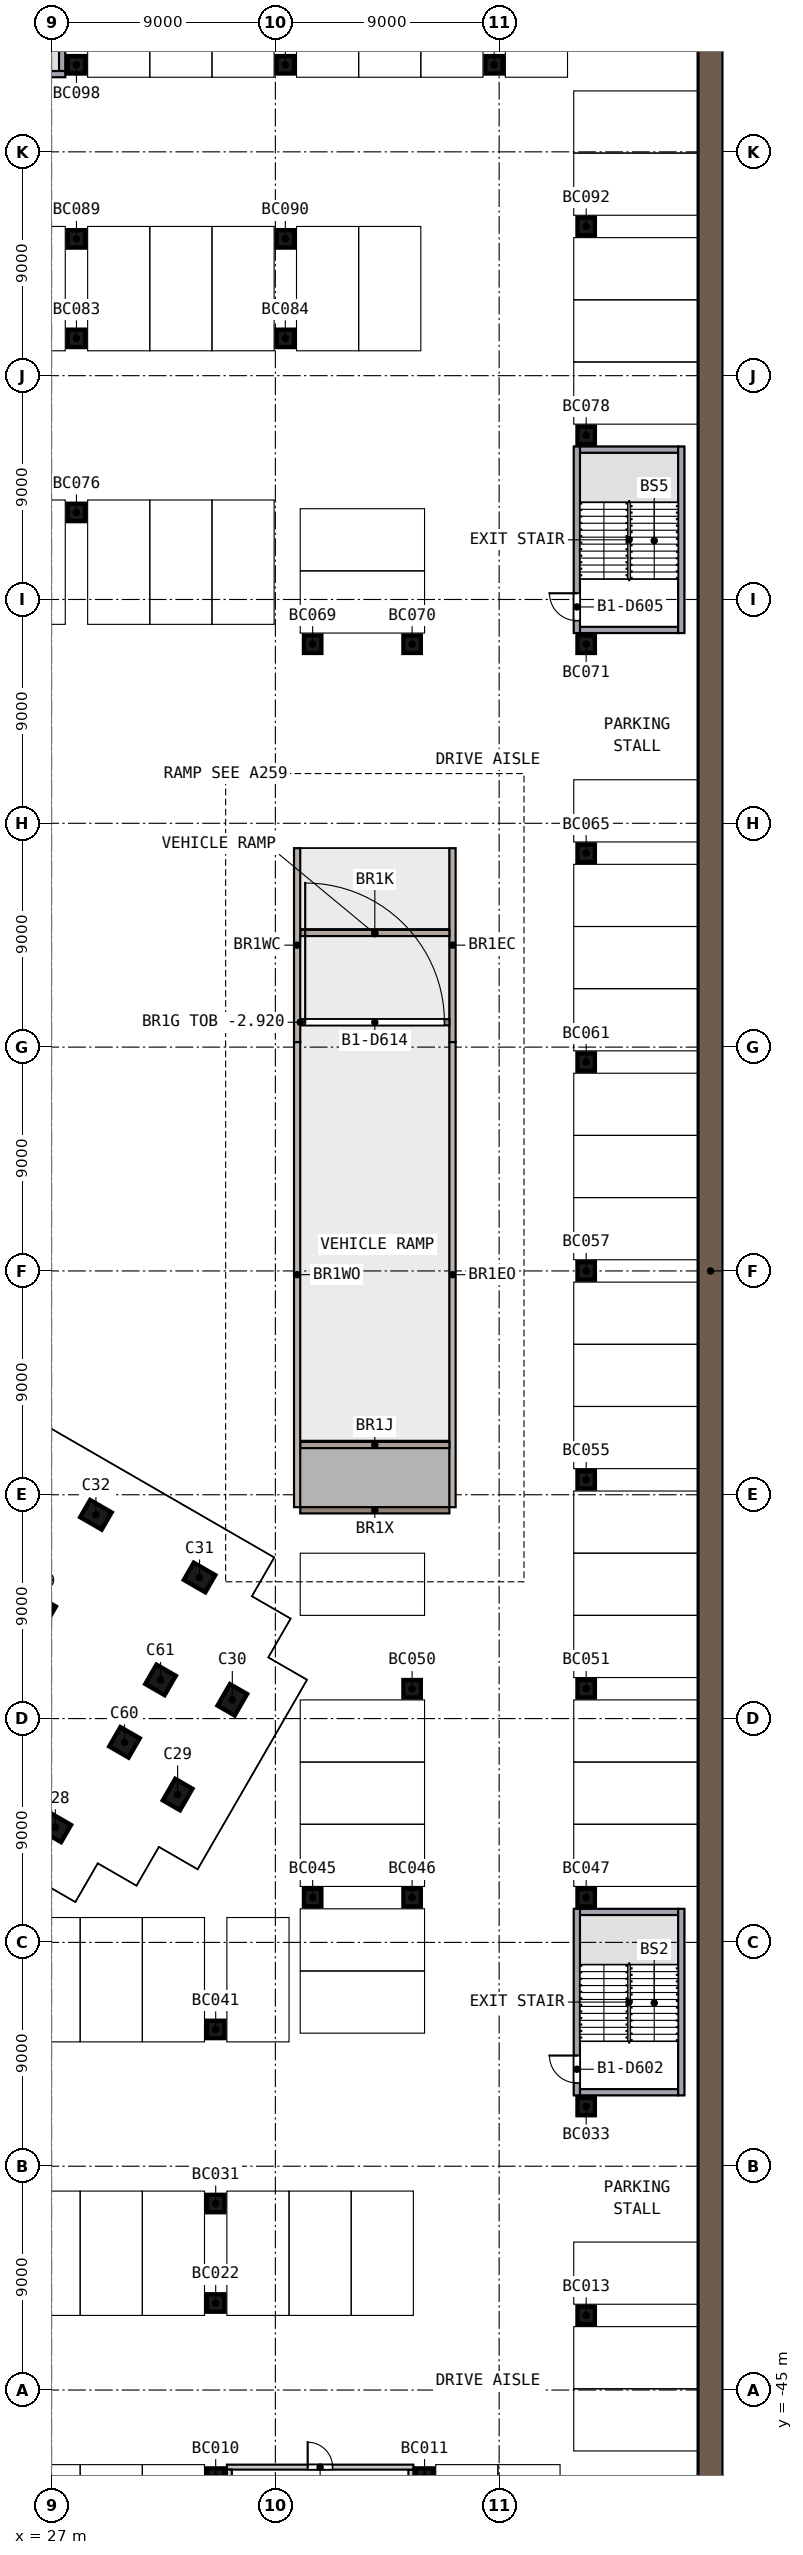
"""IFC4 building model, lengths in metres.
Left out: names, types, materials, properties, quantities, classifications, styles, units other than length and angle.
Written with IfcOpenShell. Run it as: python <this file> out.ifc"""

import sys

from ifc_helpers import new_model, si_unit, direction, frame, frame_2d, origin, origin_2d, place, context, subcontext, project, spatial, polyline, rectangle, outline, extrude, element, fill, save


model = new_model("IFC4")
c1 = context("Model", 3, precision=1e-05, world=origin(), true_north=direction((0.0, 1.0)))
c2 = subcontext(c1, "Body", "Model", "MODEL_VIEW")
j1 = project(units=[si_unit("LENGTHUNIT", "METRE"), si_unit("PLANEANGLEUNIT", "RADIAN")], contexts=[c1])
p1 = place(None, origin())
s1 = spatial("IfcSite", under=j1, at=p1, CompositionType="ELEMENT")
p2 = place(p1, origin())
s2 = spatial("IfcBuilding", under=s1, at=p2, CompositionType="ELEMENT")
p3 = place(p2, frame((0.0, 0.0, -3.9)))
s3 = spatial("IfcBuildingStorey", under=s2, at=p3, CompositionType="ELEMENT", Elevation=-3.9)
for number, where, z_axis, x_axis in (
    (1, (27.151, -22.373, 0.0), (0.0, 0.0, 1.0), (0.866, -0.5, 0.0)),
    (2, (32.069, -21.055, 0.0), (0.0, 0.0, 1.0), (0.5, 0.866, 0.0)),
    (3, (34.269, -17.245, 0.0), (0.0, 0.0, 1.0), (0.5, 0.866, 0.0)),
    (4, (32.951, -12.327, 0.0), (0.0, 0.0, 1.0), (-0.866, 0.5, 0.0)),
    (5, (28.783, -9.805, 0.0), (0.0, 0.0, 1.0), (-0.866, 0.5, 0.0)),
):
    element("IfcColumn", number, at=place(p3, frame(where, z_axis=z_axis, x_axis=x_axis)), inside=s3, PredefinedType="COLUMN", context=c2, shape_type="SweptSolid", body=[
        extrude(rectangle(XDim=1.0, YDim=0.8, at=origin_2d()), origin(), (0.0, 0.0, 1.0), 3.45),
    ])
for number, where, z_axis, x_axis in (
    (6, (26.558, -13.659, 0.0), (0.0, 0.0, 1.0), (0.866, -0.5, 0.0)),
    (7, (29.932, -18.956, 0.0), (0.0, 0.0, 1.0), (0.866, -0.5, 0.0)),
    (8, (31.382, -16.444, 0.0), (0.0, 0.0, 1.0), (0.866, -0.5, 0.0)),
):
    element("IfcColumn", number, at=place(p3, frame(where, z_axis=z_axis, x_axis=x_axis)), inside=s3, PredefinedType="COLUMN", context=c2, shape_type="SweptSolid", body=[
        extrude(rectangle(XDim=0.9, YDim=0.9, at=origin_2d()), origin(), (0.0, 0.0, 1.0), 3.45),
    ])
p4 = place(p3, origin())
e9 = element("IfcWall", 9, at=p4, inside=s3, PredefinedType="SOLIDWALL", context=c2, shape_type="SweptSolid", body=[
    extrude(outline(polyline([(54.0, -54.0), (54.0, 54.0), (53.0, 53.0), (53.0, -53.0), (54.0, -54.0)])), origin(), (0.0, 0.0, 1.0), 3.9),
])
for number, where, z_axis, x_axis in (
    (10, (33.6, -48.5, 0.0), (0.0, 0.0, 1.0), (1.0, 0.0, 0.0)),
    (11, (42.0, -48.5, 0.0), (0.0, 0.0, 1.0), (1.0, 0.0, 0.0)),
    (12, (48.5, -42.0, 0.0), (0.0, 0.0, 1.0), (1.0, 0.0, 0.0)),
    (13, (33.6, -41.5, 0.0), (0.0, 0.0, 1.0), (1.0, 0.0, 0.0)),
    (14, (33.6, -37.5, 0.0), (0.0, 0.0, 1.0), (1.0, 0.0, 0.0)),
    (15, (48.5, -33.6, 0.0), (0.0, 0.0, 1.0), (1.0, 0.0, 0.0)),
    (16, (33.6, -30.5, 0.0), (0.0, 0.0, 1.0), (1.0, 0.0, 0.0)),
    (17, (37.5, -25.2, 0.0), (0.0, 0.0, 1.0), (1.0, 0.0, 0.0)),
    (18, (41.5, -25.2, 0.0), (0.0, 0.0, 1.0), (1.0, 0.0, 0.0)),
    (19, (48.5, -25.2, 0.0), (0.0, 0.0, 1.0), (1.0, 0.0, 0.0)),
    (20, (41.5, -16.8, 0.0), (0.0, 0.0, 1.0), (1.0, 0.0, 0.0)),
    (21, (48.5, -16.8, 0.0), (0.0, 0.0, 1.0), (1.0, 0.0, 0.0)),
    (22, (48.5, -8.4, 0.0), (0.0, 0.0, 1.0), (1.0, 0.0, 0.0)),
    (23, (48.5, 0.0, 0.0), (0.0, 0.0, 1.0), (1.0, 0.0, 0.0)),
    (24, (48.5, 8.4, 0.0), (0.0, 0.0, 1.0), (1.0, 0.0, 0.0)),
    (25, (48.5, 16.8, 0.0), (0.0, 0.0, 1.0), (1.0, 0.0, 0.0)),
    (26, (37.5, 25.2, 0.0), (0.0, 0.0, 1.0), (1.0, 0.0, 0.0)),
    (27, (41.5, 25.2, 0.0), (0.0, 0.0, 1.0), (1.0, 0.0, 0.0)),
    (28, (48.5, 25.2, 0.0), (0.0, 0.0, 1.0), (1.0, 0.0, 0.0)),
    (29, (28.0, 30.5, 0.0), (0.0, 0.0, 1.0), (1.0, 0.0, 0.0)),
    (30, (48.5, 33.6, 0.0), (0.0, 0.0, 1.0), (1.0, 0.0, 0.0)),
    (31, (28.0, 37.5, 0.0), (0.0, 0.0, 1.0), (1.0, 0.0, 0.0)),
    (32, (36.4, 37.5, 0.0), (0.0, 0.0, 1.0), (1.0, 0.0, 0.0)),
    (33, (28.0, 41.5, 0.0), (0.0, 0.0, 1.0), (1.0, 0.0, 0.0)),
    (34, (36.4, 41.5, 0.0), (0.0, 0.0, 1.0), (1.0, 0.0, 0.0)),
    (35, (48.5, 42.0, 0.0), (0.0, 0.0, 1.0), (1.0, 0.0, 0.0)),
    (36, (28.0, 48.5, 0.0), (0.0, 0.0, 1.0), (1.0, 0.0, 0.0)),
    (37, (36.4, 48.5, 0.0), (0.0, 0.0, 1.0), (1.0, 0.0, 0.0)),
    (38, (44.8, 48.5, 0.0), (0.0, 0.0, 1.0), (1.0, 0.0, 0.0)),
):
    element("IfcColumn", number, at=place(p3, frame(where, z_axis=z_axis, x_axis=x_axis)), inside=s3, PredefinedType="COLUMN", context=c2, shape_type="SweptSolid", body=[
        extrude(rectangle(XDim=0.7, YDim=0.7, at=origin_2d()), origin(), (0.0, 0.0, 1.0), 3.84),
    ])
for number, where, z_axis, x_axis in (
    (39, (36.875, -9.5, 0.0), (0.0, 0.0, 1.0), (0.0, 1.0, 0.0)),
    (40, (43.125, -9.5, 0.0), (0.0, 0.0, 1.0), (0.0, 1.0, 0.0)),
):
    element("IfcWall", number, at=place(p3, frame(where, z_axis=z_axis, x_axis=x_axis)), inside=s3, PredefinedType="SOLIDWALL", context=c2, shape_type="SweptSolid", body=[
        extrude(rectangle(XDim=18.7, YDim=0.25, at=frame_2d((9.35, 0.0))), origin(), (0.0, 0.0, 1.0), 3.9),
    ])
for number, where, z_axis, x_axis in (
    (41, (36.875, 9.2, 0.0), (0.0, 0.0, 1.0), (0.0, 1.0, 0.0)),
    (42, (43.125, 9.2, 0.0), (0.0, 0.0, 1.0), (0.0, 1.0, 0.0)),
):
    element("IfcWall", number, at=place(p3, frame(where, z_axis=z_axis, x_axis=x_axis)), inside=s3, PredefinedType="SOLIDWALL", context=c2, shape_type="SweptSolid", body=[
        extrude(rectangle(XDim=7.8, YDim=0.25, at=frame_2d((3.9, 0.0))), origin(), (0.0, 0.0, 1.0), 3.3),
    ])
p5 = place(p3, frame((37.0, -9.625, 0.0), z_axis=(0.0, 0.0, 1.0), x_axis=(1.0, 0.0, 0.0)))
e43 = element("IfcWall", 43, at=p5, inside=s3, PredefinedType="SOLIDWALL", context=c2, shape_type="SweptSolid", body=[
    extrude(rectangle(XDim=6.0, YDim=0.25, at=frame_2d((3.0, 0.0))), origin(), (0.0, 0.0, 1.0), 3.3),
])
p6 = place(p3, frame((37.0, -7.0, 0.0), z_axis=(0.0, 0.0, 1.0), x_axis=(1.0, 0.0, 0.0)))
e44 = element("IfcWall", 44, at=p6, inside=s3, PredefinedType="SOLIDWALL", context=c2, shape_type="SweptSolid", body=[
    extrude(rectangle(XDim=6.0, YDim=0.25, at=frame_2d((3.0, 0.0))), origin(), (0.0, 0.0, 1.0), 3.734),
])
p7 = place(p3, frame((37.0, 13.591, 0.0), z_axis=(0.0, 0.0, 1.0), x_axis=(1.0, 0.0, 0.0)))
e45 = element("IfcWall", 45, at=p7, inside=s3, PredefinedType="SOLIDWALL", context=c2, shape_type="SweptSolid", body=[
    extrude(rectangle(XDim=6.0, YDim=0.25, at=frame_2d((3.0, 0.0))), origin(), (0.0, 0.0, 1.0), 0.395),
])
p8 = place(p3, frame((37.0, 10.0, 0.979), z_axis=(0.0, 0.0, 1.0), x_axis=(1.0, 0.0, 0.0)))
e46 = element("IfcWall", 46, at=p8, inside=s3, PredefinedType="PARTITIONING", context=c2, shape_type="SweptSolid", body=[
    extrude(rectangle(XDim=6.0, YDim=0.25, at=frame_2d((3.0, 0.0))), origin(), (0.0, 0.0, 1.0), 2.32),
])
p9 = place(p8, frame((0.2, 0.0, 0.0)))
e47 = element("IfcOpeningElement", 47, at=p9, cuts=e46, PredefinedType="OPENING", context=c2, shape_type="SweptSolid", body=[
    extrude(rectangle(XDim=5.6, YDim=2.2, at=frame_2d((2.8, 1.1))), frame((0.0, 0.135, 0.0), z_axis=(0.0, -1.0, 0.0), x_axis=(1.0, 0.0, 0.0)), (0.0, 0.0, 1.0), 0.27),
])
p10 = place(p3, frame((48.125, -33.15, 0.0), z_axis=(0.0, 0.0, 1.0), x_axis=(0.0, 1.0, 0.0)))
e48 = element("IfcWall", 48, at=p10, inside=s3, PredefinedType="SOLIDWALL", context=c2, shape_type="SweptSolid", body=[
    extrude(rectangle(XDim=7.5, YDim=0.25, at=frame_2d((3.75, 0.0))), origin(), (0.0, 0.0, 1.0), 3.9),
])
p11 = place(p10, frame((0.5, 0.0, 0.0)))
e49 = element("IfcOpeningElement", 49, at=p11, cuts=e48, PredefinedType="OPENING", context=c2, shape_type="SweptSolid", body=[
    extrude(rectangle(XDim=1.1, YDim=2.1, at=frame_2d((0.55, 1.05))), frame((0.0, 0.135, 0.0), z_axis=(0.0, -1.0, 0.0), x_axis=(1.0, 0.0, 0.0)), (0.0, 0.0, 1.0), 0.27),
])
p12 = place(p3, frame((52.325, -33.15, 0.0), z_axis=(0.0, 0.0, 1.0), x_axis=(0.0, 1.0, 0.0)))
e50 = element("IfcWall", 50, at=p12, inside=s3, PredefinedType="SOLIDWALL", context=c2, shape_type="SweptSolid", body=[
    extrude(rectangle(XDim=7.5, YDim=0.25, at=frame_2d((3.75, 0.0))), origin(), (0.0, 0.0, 1.0), 3.9),
])
for number, where, z_axis, x_axis in (
    (51, (52.2, -33.025, 0.0), (0.0, 0.0, 1.0), (-1.0, 0.0, 0.0)),
    (52, (52.2, -25.775, 0.0), (0.0, 0.0, 1.0), (-1.0, 0.0, 0.0)),
):
    element("IfcWall", number, at=place(p3, frame(where, z_axis=z_axis, x_axis=x_axis)), inside=s3, PredefinedType="SOLIDWALL", context=c2, shape_type="SweptSolid", body=[
        extrude(rectangle(XDim=3.95, YDim=0.25, at=frame_2d((1.975, 0.0))), origin(), (0.0, 0.0, 1.0), 3.9),
    ])
p13 = place(p3, frame((20.05, 48.125, 0.0), z_axis=(0.0, 0.0, 1.0), x_axis=(1.0, 0.0, 0.0)))
e53 = element("IfcWall", 53, at=p13, inside=s3, PredefinedType="SOLIDWALL", context=c2, shape_type="SweptSolid", body=[
    extrude(rectangle(XDim=7.5, YDim=0.25, at=frame_2d((3.75, 0.0))), origin(), (0.0, 0.0, 1.0), 3.9),
])
p14 = place(p13, frame((0.5, 0.0, 0.0)))
e54 = element("IfcOpeningElement", 54, at=p14, cuts=e53, PredefinedType="OPENING", context=c2, shape_type="SweptSolid", body=[
    extrude(rectangle(XDim=1.1, YDim=2.1, at=frame_2d((0.55, 1.05))), frame((0.0, 0.135, 0.0), z_axis=(0.0, -1.0, 0.0), x_axis=(1.0, 0.0, 0.0)), (0.0, 0.0, 1.0), 0.27),
])
p15 = place(p3, frame((27.425, 48.25, 0.0), z_axis=(0.0, 0.0, 1.0), x_axis=(0.0, 1.0, 0.0)))
e55 = element("IfcWall", 55, at=p15, inside=s3, PredefinedType="SOLIDWALL", context=c2, shape_type="SweptSolid", body=[
    extrude(rectangle(XDim=3.95, YDim=0.25, at=frame_2d((1.975, 0.0))), origin(), (0.0, 0.0, 1.0), 3.9),
])
p16 = place(p3, frame((48.125, 25.65, 0.0), z_axis=(0.0, 0.0, 1.0), x_axis=(0.0, 1.0, 0.0)))
e56 = element("IfcWall", 56, at=p16, inside=s3, PredefinedType="SOLIDWALL", context=c2, shape_type="SweptSolid", body=[
    extrude(rectangle(XDim=7.5, YDim=0.25, at=frame_2d((3.75, 0.0))), origin(), (0.0, 0.0, 1.0), 3.9),
])
p17 = place(p16, frame((0.5, 0.0, 0.0)))
e57 = element("IfcOpeningElement", 57, at=p17, cuts=e56, PredefinedType="OPENING", context=c2, shape_type="SweptSolid", body=[
    extrude(rectangle(XDim=1.1, YDim=2.1, at=frame_2d((0.55, 1.05))), frame((0.0, 0.135, 0.0), z_axis=(0.0, -1.0, 0.0), x_axis=(1.0, 0.0, 0.0)), (0.0, 0.0, 1.0), 0.27),
])
p18 = place(p3, frame((52.325, 25.65, 0.0), z_axis=(0.0, 0.0, 1.0), x_axis=(0.0, 1.0, 0.0)))
e58 = element("IfcWall", 58, at=p18, inside=s3, PredefinedType="SOLIDWALL", context=c2, shape_type="SweptSolid", body=[
    extrude(rectangle(XDim=7.5, YDim=0.25, at=frame_2d((3.75, 0.0))), origin(), (0.0, 0.0, 1.0), 3.9),
])
for number, where, z_axis, x_axis in (
    (59, (52.2, 25.775, 0.0), (0.0, 0.0, 1.0), (-1.0, 0.0, 0.0)),
    (60, (52.2, 33.025, 0.0), (0.0, 0.0, 1.0), (-1.0, 0.0, 0.0)),
):
    element("IfcWall", number, at=place(p3, frame(where, z_axis=z_axis, x_axis=x_axis)), inside=s3, PredefinedType="SOLIDWALL", context=c2, shape_type="SweptSolid", body=[
        extrude(rectangle(XDim=3.95, YDim=0.25, at=frame_2d((1.975, 0.0))), origin(), (0.0, 0.0, 1.0), 3.9),
    ])
p19 = place(p3, frame((34.05, -48.1, 0.0), z_axis=(0.0, 0.0, 1.0), x_axis=(1.0, 0.0, 0.0)))
e61 = element("IfcWall", 61, at=p19, inside=s3, PredefinedType="PARTITIONING", context=c2, shape_type="SweptSolid", body=[
    extrude(rectangle(XDim=7.5, YDim=0.2, at=frame_2d((3.75, 0.0))), origin(), (0.0, 0.0, 1.0), 3.3),
])
p20 = place(p19, frame((3.25, 0.0, 0.0)))
e62 = element("IfcOpeningElement", 62, at=p20, cuts=e61, PredefinedType="OPENING", context=c2, shape_type="SweptSolid", body=[
    extrude(rectangle(XDim=1.0, YDim=2.1, at=frame_2d((0.5, 1.05))), frame((0.0, 0.11, 0.0), z_axis=(0.0, -1.0, 0.0), x_axis=(1.0, 0.0, 0.0)), (0.0, 0.0, 1.0), 0.22),
])
for number, where, z_axis, x_axis in (
    (63, (34.15, -51.4, 0.0), (0.0, 0.0, 1.0), (0.0, 1.0, 0.0)),
    (64, (41.45, -51.4, 0.0), (0.0, 0.0, 1.0), (0.0, 1.0, 0.0)),
):
    element("IfcWall", number, at=place(p3, frame(where, z_axis=z_axis, x_axis=x_axis)), inside=s3, PredefinedType="PARTITIONING", context=c2, shape_type="SweptSolid", body=[
        extrude(rectangle(XDim=3.2, YDim=0.2, at=frame_2d((1.6, 0.0))), origin(), (0.0, 0.0, 1.0), 3.3),
    ])
p21 = place(p11, origin())
e65 = element("IfcDoor", 65, at=p21, inside=s3, OperationType="SINGLE_SWING_RIGHT", PredefinedType="DOOR", context=c2, shape_type="SweptSolid", body=[
    extrude(rectangle(XDim=1.1, YDim=2.1, at=frame_2d((0.55, 1.05))), frame((0.0, 0.025, 0.0), z_axis=(0.0, -1.0, 0.0), x_axis=(1.0, 0.0, 0.0)), (0.0, 0.0, 1.0), 0.05),
])
fill(e49, e65)
p22 = place(p17, origin())
e66 = element("IfcDoor", 66, at=p22, inside=s3, OperationType="SINGLE_SWING_RIGHT", PredefinedType="DOOR", context=c2, shape_type="SweptSolid", body=[
    extrude(rectangle(XDim=1.1, YDim=2.1, at=frame_2d((0.55, 1.05))), frame((0.0, 0.025, 0.0), z_axis=(0.0, -1.0, 0.0), x_axis=(1.0, 0.0, 0.0)), (0.0, 0.0, 1.0), 0.05),
])
fill(e57, e66)
p23 = place(p20, origin())
e67 = element("IfcDoor", 67, at=p23, inside=s3, OperationType="SINGLE_SWING_LEFT", PredefinedType="DOOR", context=c2, shape_type="SweptSolid", body=[
    extrude(rectangle(XDim=1.0, YDim=2.1, at=frame_2d((0.5, 1.05))), frame((0.0, 0.025, 0.0), z_axis=(0.0, -1.0, 0.0), x_axis=(1.0, 0.0, 0.0)), (0.0, 0.0, 1.0), 0.05),
])
fill(e62, e67)
p24 = place(p9, origin())
e68 = element("IfcDoor", 68, at=p24, inside=s3, OperationType="ROLLINGUP", PredefinedType="DOOR", context=c2, shape_type="SweptSolid", body=[
    extrude(rectangle(XDim=5.6, YDim=2.2, at=frame_2d((2.8, 1.1))), frame((0.0, 0.025, 0.0), z_axis=(0.0, -1.0, 0.0), x_axis=(1.0, 0.0, 0.0)), (0.0, 0.0, 1.0), 0.05),
])
fill(e47, e68)
save(model, sys.argv[1])
